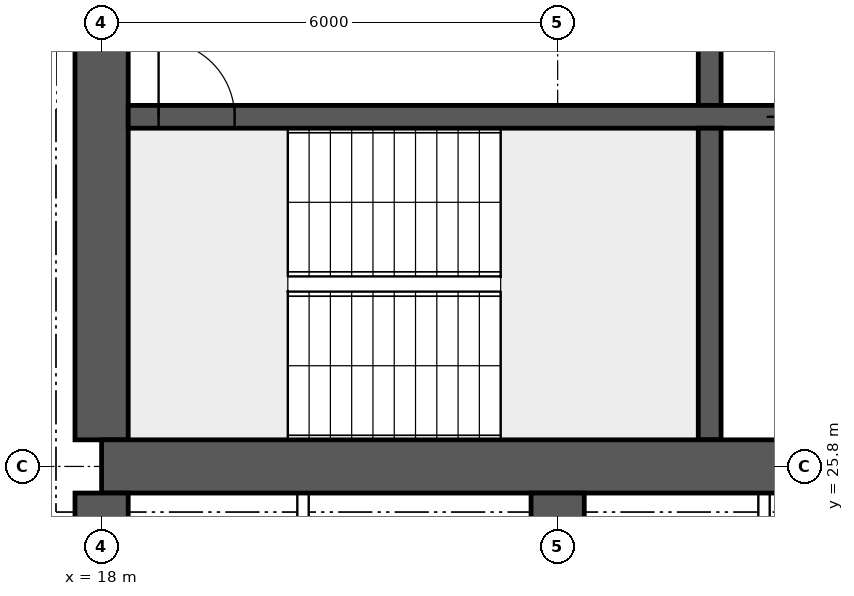
"""IFC4 building model, lengths in metres.
Left out: names, types, materials, properties, quantities, classifications, styles, units other than length and angle.
Written with IfcOpenShell. Run it as: python <this file> out.ifc"""

import sys

from ifc_helpers import new_model, si_unit, direction, frame, frame_2d, origin, place, context, subcontext, project, spatial, rectangle, extrude, element, fill, save


model = new_model("IFC4")
c1 = context("Model", 3, precision=1e-05, world=origin(), true_north=direction((0.0, 1.0)))
c2 = subcontext(c1, "Body", "Model", "MODEL_VIEW")
j1 = project(units=[si_unit("LENGTHUNIT", "METRE"), si_unit("PLANEANGLEUNIT", "RADIAN")], contexts=[c1])
p1 = place(None, origin())
s1 = spatial("IfcSite", under=j1, at=p1, CompositionType="ELEMENT")
p2 = place(p1, origin())
s2 = spatial("IfcBuilding", under=s1, at=p2, CompositionType="ELEMENT")
p3 = place(p2, frame((0.0, 0.0, 242.8)))
s3 = spatial("IfcBuildingStorey", under=s2, at=p3, CompositionType="ELEMENT", Elevation=242.8)
p4 = place(p3, frame((18.0, 25.8, 0.0), z_axis=(0.0, 0.0, 1.0), x_axis=(1.0, 0.0, 0.0)))
e1 = element("IfcWall", 1, at=p4, inside=s3, PredefinedType="SHEAR", context=c2, shape_type="SweptSolid", body=[
    extrude(rectangle(XDim=48.0, YDim=0.7, at=frame_2d((24.0, 0.0))), origin(), (0.0, 0.0, 1.0), 3.75),
])
p5 = place(p3, frame((18.0, 26.15, 0.0), z_axis=(0.0, 0.0, 1.0), x_axis=(0.0, 1.0, 0.0)))
e2 = element("IfcWall", 2, at=p5, inside=s3, PredefinedType="SHEAR", context=c2, shape_type="SweptSolid", body=[
    extrude(rectangle(XDim=11.7, YDim=0.7, at=frame_2d((5.85, 0.0))), origin(), (0.0, 0.0, 1.0), 3.75),
])
p6 = place(p5, frame((5.15, 0.0, 0.0)))
e3 = element("IfcOpeningElement", 3, at=p6, cuts=e2, PredefinedType="OPENING", context=c2, shape_type="SweptSolid", body=[
    extrude(rectangle(XDim=1.2, YDim=2.1, at=frame_2d((0.6, 1.05))), frame((0.0, 0.36, 0.0), z_axis=(0.0, -1.0, 0.0), x_axis=(1.0, 0.0, 0.0)), (0.0, 0.0, 1.0), 0.72),
])
p7 = place(p3, frame((18.35, 30.4, 0.0), z_axis=(0.0, 0.0, 1.0), x_axis=(1.0, 0.0, 0.0)))
e4 = element("IfcWall", 4, at=p7, inside=s3, PredefinedType="SHEAR", context=c2, shape_type="SweptSolid", body=[
    extrude(rectangle(XDim=47.3, YDim=0.3, at=frame_2d((23.65, 0.0))), origin(), (0.0, 0.0, 1.0), 3.75),
])
p8 = place(p7, frame((0.4, 0.0, 0.0)))
e5 = element("IfcOpeningElement", 5, at=p8, cuts=e4, PredefinedType="OPENING", context=c2, shape_type="SweptSolid", body=[
    extrude(rectangle(XDim=1.0, YDim=2.1, at=frame_2d((0.5, 1.05))), frame((0.0, 0.16, 0.0), z_axis=(0.0, -1.0, 0.0), x_axis=(1.0, 0.0, 0.0)), (0.0, 0.0, 1.0), 0.32),
])
p9 = place(p7, frame((45.9, 0.0, 0.0)))
e6 = element("IfcOpeningElement", 6, at=p9, cuts=e4, PredefinedType="OPENING", context=c2, shape_type="SweptSolid", body=[
    extrude(rectangle(XDim=1.0, YDim=2.1, at=frame_2d((0.5, 1.05))), frame((0.0, 0.16, 0.0), z_axis=(0.0, -1.0, 0.0), x_axis=(1.0, 0.0, 0.0)), (0.0, 0.0, 1.0), 0.32),
])
p10 = place(p7, frame((8.4, 0.0, 0.0)))
e7 = element("IfcOpeningElement", 7, at=p10, cuts=e4, PredefinedType="OPENING", context=c2, shape_type="SweptSolid", body=[
    extrude(rectangle(XDim=1.1, YDim=2.1, at=frame_2d((0.55, 1.05))), frame((0.0, 0.16, 0.0), z_axis=(0.0, -1.0, 0.0), x_axis=(1.0, 0.0, 0.0)), (0.0, 0.0, 1.0), 0.32),
])
p11 = place(p7, frame((11.0, 0.0, 0.0)))
e8 = element("IfcOpeningElement", 8, at=p11, cuts=e4, PredefinedType="OPENING", context=c2, shape_type="SweptSolid", body=[
    extrude(rectangle(XDim=1.1, YDim=2.1, at=frame_2d((0.55, 1.05))), frame((0.0, 0.16, 0.0), z_axis=(0.0, -1.0, 0.0), x_axis=(1.0, 0.0, 0.0)), (0.0, 0.0, 1.0), 0.32),
])
p12 = place(p7, frame((13.6, 0.0, 0.0)))
e9 = element("IfcOpeningElement", 9, at=p12, cuts=e4, PredefinedType="OPENING", context=c2, shape_type="SweptSolid", body=[
    extrude(rectangle(XDim=1.1, YDim=2.1, at=frame_2d((0.55, 1.05))), frame((0.0, 0.16, 0.0), z_axis=(0.0, -1.0, 0.0), x_axis=(1.0, 0.0, 0.0)), (0.0, 0.0, 1.0), 0.32),
])
p13 = place(p7, frame((16.2, 0.0, 0.0)))
e10 = element("IfcOpeningElement", 10, at=p13, cuts=e4, PredefinedType="OPENING", context=c2, shape_type="SweptSolid", body=[
    extrude(rectangle(XDim=1.1, YDim=2.1, at=frame_2d((0.55, 1.05))), frame((0.0, 0.16, 0.0), z_axis=(0.0, -1.0, 0.0), x_axis=(1.0, 0.0, 0.0)), (0.0, 0.0, 1.0), 0.32),
])
p14 = place(p7, frame((18.975, 0.0, 0.0)))
e11 = element("IfcOpeningElement", 11, at=p14, cuts=e4, PredefinedType="OPENING", context=c2, shape_type="SweptSolid", body=[
    extrude(rectangle(XDim=0.9, YDim=2.1, at=frame_2d((0.45, 1.05))), frame((0.0, 0.16, 0.0), z_axis=(0.0, -1.0, 0.0), x_axis=(1.0, 0.0, 0.0)), (0.0, 0.0, 1.0), 0.32),
])
p15 = place(p7, frame((24.475, 0.0, 0.0)))
e12 = element("IfcOpeningElement", 12, at=p15, cuts=e4, PredefinedType="OPENING", context=c2, shape_type="SweptSolid", body=[
    extrude(rectangle(XDim=0.9, YDim=2.1, at=frame_2d((0.45, 1.05))), frame((0.0, 0.16, 0.0), z_axis=(0.0, -1.0, 0.0), x_axis=(1.0, 0.0, 0.0)), (0.0, 0.0, 1.0), 0.32),
])
p16 = place(p7, frame((30.267, 0.0, 0.0)))
e13 = element("IfcOpeningElement", 13, at=p16, cuts=e4, PredefinedType="OPENING", context=c2, shape_type="SweptSolid", body=[
    extrude(rectangle(XDim=1.1, YDim=2.1, at=frame_2d((0.55, 1.05))), frame((0.0, 0.16, 0.0), z_axis=(0.0, -1.0, 0.0), x_axis=(1.0, 0.0, 0.0)), (0.0, 0.0, 1.0), 0.32),
])
p17 = place(p7, frame((33.8, 0.0, 0.0)))
e14 = element("IfcOpeningElement", 14, at=p17, cuts=e4, PredefinedType="OPENING", context=c2, shape_type="SweptSolid", body=[
    extrude(rectangle(XDim=1.1, YDim=2.1, at=frame_2d((0.55, 1.05))), frame((0.0, 0.16, 0.0), z_axis=(0.0, -1.0, 0.0), x_axis=(1.0, 0.0, 0.0)), (0.0, 0.0, 1.0), 0.32),
])
p18 = place(p7, frame((37.333, 0.0, 0.0)))
e15 = element("IfcOpeningElement", 15, at=p18, cuts=e4, PredefinedType="OPENING", context=c2, shape_type="SweptSolid", body=[
    extrude(rectangle(XDim=1.1, YDim=2.1, at=frame_2d((0.55, 1.05))), frame((0.0, 0.16, 0.0), z_axis=(0.0, -1.0, 0.0), x_axis=(1.0, 0.0, 0.0)), (0.0, 0.0, 1.0), 0.32),
])
p19 = place(p3, frame((26.0, 26.15, 0.0), z_axis=(0.0, 0.0, 1.0), x_axis=(0.0, 1.0, 0.0)))
e16 = element("IfcWall", 16, at=p19, inside=s3, PredefinedType="SHEAR", context=c2, shape_type="SweptSolid", body=[
    extrude(rectangle(XDim=4.1, YDim=0.3, at=frame_2d((2.05, 0.0))), origin(), (0.0, 0.0, 1.0), 3.75),
])
p20 = place(p3, frame((26.0, 30.55, 0.0), z_axis=(0.0, 0.0, 1.0), x_axis=(0.0, 1.0, 0.0)))
e17 = element("IfcWall", 17, at=p20, inside=s3, PredefinedType="SHEAR", context=c2, shape_type="SweptSolid", body=[
    extrude(rectangle(XDim=3.9, YDim=0.3, at=frame_2d((1.95, 0.0))), origin(), (0.0, 0.0, 1.0), 3.75),
])
p21 = place(p20, frame((1.4, 0.0, 0.0)))
e18 = element("IfcOpeningElement", 18, at=p21, cuts=e17, PredefinedType="OPENING", context=c2, shape_type="SweptSolid", body=[
    extrude(rectangle(XDim=1.2, YDim=2.1, at=frame_2d((0.6, 1.05))), frame((0.0, 0.16, 0.0), z_axis=(0.0, -1.0, 0.0), x_axis=(1.0, 0.0, 0.0)), (0.0, 0.0, 1.0), 0.32),
])
for number, where, z_axis, x_axis in (
    (19, (18.0, 18.4, 0.0), (0.0, 0.0, 1.0), (0.0, 1.0, 0.0)),
    (20, (24.0, 18.4, 0.0), (0.0, 0.0, 1.0), (0.0, 1.0, 0.0)),
):
    element("IfcWall", number, at=place(p3, frame(where, z_axis=z_axis, x_axis=x_axis)), inside=s3, PredefinedType="SHEAR", context=c2, shape_type="SweptSolid", body=[
        extrude(rectangle(XDim=7.05, YDim=0.7, at=frame_2d((3.525, 0.0))), origin(), (0.0, 0.0, 1.0), 3.75),
    ])
for number, where, z_axis, x_axis in (
    (21, (20.65, 18.5, 0.0), (0.0, 0.0, 1.0), (0.0, 1.0, 0.0)),
    (22, (26.715, 18.5, 0.0), (0.0, 0.0, 1.0), (0.0, 1.0, 0.0)),
):
    element("IfcWall", number, at=place(p3, frame(where, z_axis=z_axis, x_axis=x_axis)), inside=s3, PredefinedType="PARTITIONING", context=c2, shape_type="SweptSolid", body=[
        extrude(rectangle(XDim=6.95, YDim=0.15, at=frame_2d((3.475, 0.0))), origin(), (0.0, 0.0, 1.0), 3.3),
    ])
p22 = place(p8, origin())
e23 = element("IfcDoor", 23, at=p22, inside=s3, OperationType="SINGLE_SWING_LEFT", PredefinedType="DOOR", context=c2, shape_type="SweptSolid", body=[
    extrude(rectangle(XDim=1.0, YDim=2.1, at=frame_2d((0.5, 1.05))), frame((0.0, 0.025, 0.0), z_axis=(0.0, -1.0, 0.0), x_axis=(1.0, 0.0, 0.0)), (0.0, 0.0, 1.0), 0.05),
])
fill(e5, e23)
p23 = place(p10, origin())
e24 = element("IfcDoor", 24, at=p23, inside=s3, OperationType="DOUBLE_DOOR_SLIDING", PredefinedType="DOOR", context=c2, shape_type="SweptSolid", body=[
    extrude(rectangle(XDim=1.1, YDim=2.1, at=frame_2d((0.55, 1.05))), frame((0.0, 0.025, 0.0), z_axis=(0.0, -1.0, 0.0), x_axis=(1.0, 0.0, 0.0)), (0.0, 0.0, 1.0), 0.05),
])
fill(e7, e24)
save(model, sys.argv[1])
